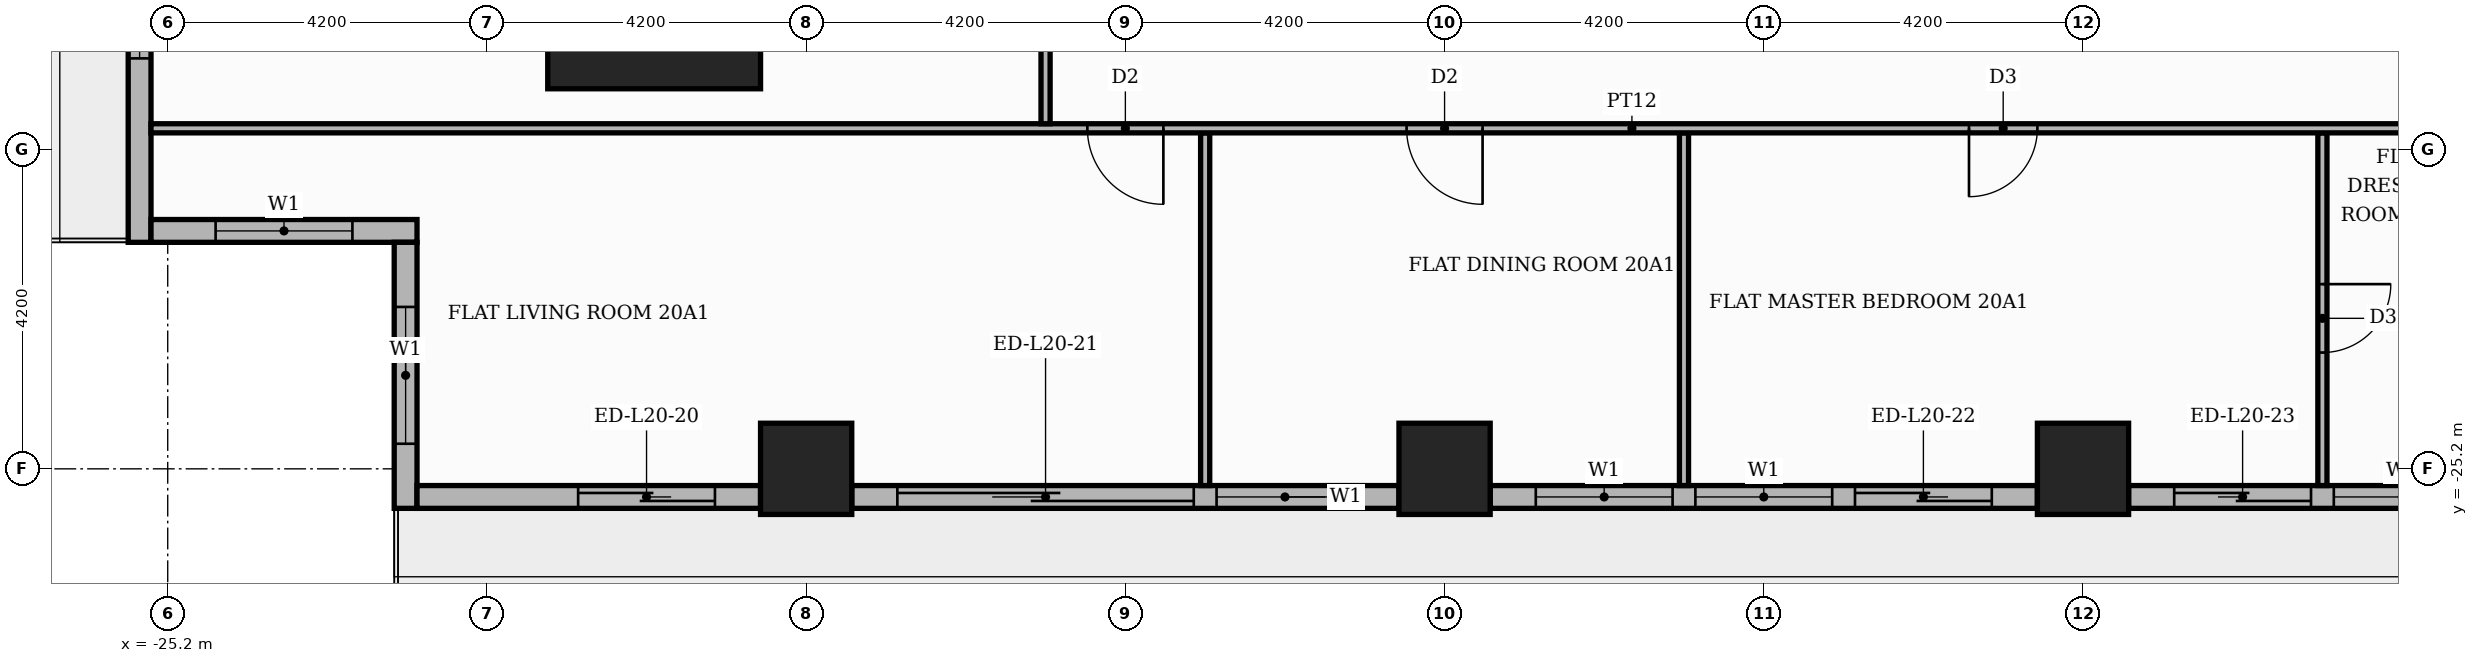
"""IFC4 building model, lengths in metres.
Left out: names, types, materials, properties, quantities, classifications, styles, units other than length and angle.
Written with IfcOpenShell. Run it as: python <this file> out.ifc"""

import sys

from ifc_helpers import new_model, si_unit, direction, frame, frame_2d, origin, origin_2d, place, context, subcontext, project, spatial, rectangle, extrude, element, fill, save


model = new_model("IFC4")
c1 = context("Model", 3, precision=1e-05, world=origin(), true_north=direction((0.0, 1.0)))
c2 = subcontext(c1, "Body", "Model", "MODEL_VIEW")
j1 = project(units=[si_unit("LENGTHUNIT", "METRE"), si_unit("PLANEANGLEUNIT", "RADIAN")], contexts=[c1])
p1 = place(None, origin())
s1 = spatial("IfcSite", under=j1, at=p1, CompositionType="ELEMENT")
p2 = place(p1, origin())
s2 = spatial("IfcBuilding", under=s1, at=p2, CompositionType="ELEMENT")
p3 = place(p2, frame((0.0, 0.0, 87.0)))
s3 = spatial("IfcBuildingStorey", under=s2, at=p3, CompositionType="ELEMENT", Elevation=87.0)
p4 = place(p3, frame((-18.8, -18.8, 0.0), z_axis=(0.0, 0.0, 1.0), x_axis=(1.0, 0.0, 0.0)))
e1 = element("IfcColumn", 1, at=p4, inside=s3, PredefinedType="COLUMN", context=c2, shape_type="SweptSolid", body=[
    extrude(rectangle(XDim=2.8, YDim=2.8, at=origin_2d()), origin(), (0.0, 0.0, 1.0), 3.9),
])
for number, where, z_axis, x_axis in (
    (2, (0.0, -25.2, 0.0), (0.0, 0.0, 1.0), (1.0, 0.0, 0.0)),
    (3, (-8.4, -25.2, 0.0), (0.0, 0.0, 1.0), (1.0, 0.0, 0.0)),
    (4, (-16.8, -25.2, 0.0), (0.0, 0.0, 1.0), (1.0, 0.0, 0.0)),
):
    element("IfcColumn", number, at=place(p3, frame(where, z_axis=z_axis, x_axis=x_axis)), inside=s3, PredefinedType="COLUMN", context=c2, shape_type="SweptSolid", body=[
        extrude(rectangle(XDim=1.2, YDim=1.2, at=origin_2d()), origin(), (0.0, 0.0, 1.0), 3.9),
    ])
p5 = place(p3, frame((-25.57, -17.4, 0.0), z_axis=(0.0, 0.0, 1.0), x_axis=(0.0, -1.0, 0.0)))
e5 = element("IfcWall", 5, at=p5, inside=s3, PredefinedType="STANDARD", context=c2, shape_type="SweptSolid", body=[
    extrude(rectangle(XDim=4.82, YDim=0.3, at=frame_2d((2.41, 0.0))), origin(), (0.0, 0.0, 1.0), 3.48),
])
p6 = place(p5, frame((0.6, 0.0, 0.9)))
e6 = element("IfcOpeningElement", 6, at=p6, cuts=e5, PredefinedType="OPENING", context=c2, shape_type="SweptSolid", body=[
    extrude(rectangle(XDim=1.8, YDim=2.1, at=frame_2d((0.9, 1.05))), frame((0.0, 0.16, 0.0), z_axis=(0.0, -1.0, 0.0), x_axis=(1.0, 0.0, 0.0)), (0.0, 0.0, 1.0), 0.32),
])
p7 = place(p3, frame((-25.42, -22.07, 0.0), z_axis=(0.0, 0.0, 1.0), x_axis=(1.0, 0.0, 0.0)))
e7 = element("IfcWall", 7, at=p7, inside=s3, PredefinedType="STANDARD", context=c2, shape_type="SweptSolid", body=[
    extrude(rectangle(XDim=3.5, YDim=0.3, at=frame_2d((1.75, 0.0))), origin(), (0.0, 0.0, 1.0), 3.48),
])
p8 = place(p7, frame((0.85, 0.0, 0.9)))
e8 = element("IfcOpeningElement", 8, at=p8, cuts=e7, PredefinedType="OPENING", context=c2, shape_type="SweptSolid", body=[
    extrude(rectangle(XDim=1.8, YDim=2.1, at=frame_2d((0.9, 1.05))), frame((0.0, 0.16, 0.0), z_axis=(0.0, -1.0, 0.0), x_axis=(1.0, 0.0, 0.0)), (0.0, 0.0, 1.0), 0.32),
])
p9 = place(p3, frame((-22.07, -22.22, 0.0), z_axis=(0.0, 0.0, 1.0), x_axis=(0.0, -1.0, 0.0)))
e9 = element("IfcWall", 9, at=p9, inside=s3, PredefinedType="STANDARD", context=c2, shape_type="SweptSolid", body=[
    extrude(rectangle(XDim=3.5, YDim=0.3, at=frame_2d((1.75, 0.0))), origin(), (0.0, 0.0, 1.0), 3.48),
])
p10 = place(p9, frame((0.85, 0.0, 0.9)))
e10 = element("IfcOpeningElement", 10, at=p10, cuts=e9, PredefinedType="OPENING", context=c2, shape_type="SweptSolid", body=[
    extrude(rectangle(XDim=1.8, YDim=2.1, at=frame_2d((0.9, 1.05))), frame((0.0, 0.16, 0.0), z_axis=(0.0, -1.0, 0.0), x_axis=(1.0, 0.0, 0.0)), (0.0, 0.0, 1.0), 0.32),
])
p11 = place(p3, frame((-21.92, -25.57, 0.0), z_axis=(0.0, 0.0, 1.0), x_axis=(1.0, 0.0, 0.0)))
e11 = element("IfcWall", 11, at=p11, inside=s3, PredefinedType="STANDARD", context=c2, shape_type="SweptSolid", body=[
    extrude(rectangle(XDim=4.52, YDim=0.3, at=frame_2d((2.26, 0.0))), origin(), (0.0, 0.0, 1.0), 3.48),
])
p12 = place(p11, frame((2.12, 0.0, 0.0)))
e12 = element("IfcOpeningElement", 12, at=p12, cuts=e11, PredefinedType="OPENING", context=c2, shape_type="SweptSolid", body=[
    extrude(rectangle(XDim=1.8, YDim=2.4, at=frame_2d((0.9, 1.2))), frame((0.0, 0.16, 0.0), z_axis=(0.0, -1.0, 0.0), x_axis=(1.0, 0.0, 0.0)), (0.0, 0.0, 1.0), 0.32),
])
p13 = place(p3, frame((-16.2, -25.57, 0.0), z_axis=(0.0, 0.0, 1.0), x_axis=(1.0, 0.0, 0.0)))
e13 = element("IfcWall", 13, at=p13, inside=s3, PredefinedType="STANDARD", context=c2, shape_type="SweptSolid", body=[
    extrude(rectangle(XDim=7.2, YDim=0.3, at=frame_2d((3.6, 0.0))), origin(), (0.0, 0.0, 1.0), 3.48),
])
p14 = place(p13, frame((0.6, 0.0, 0.0)))
e14 = element("IfcOpeningElement", 14, at=p14, cuts=e13, PredefinedType="OPENING", context=c2, shape_type="SweptSolid", body=[
    extrude(rectangle(XDim=3.9, YDim=2.4, at=frame_2d((1.95, 1.2))), frame((0.0, 0.16, 0.0), z_axis=(0.0, -1.0, 0.0), x_axis=(1.0, 0.0, 0.0)), (0.0, 0.0, 1.0), 0.32),
])
p15 = place(p13, frame((4.8, 0.0, 0.9)))
e15 = element("IfcOpeningElement", 15, at=p15, cuts=e13, PredefinedType="OPENING", context=c2, shape_type="SweptSolid", body=[
    extrude(rectangle(XDim=1.8, YDim=2.1, at=frame_2d((0.9, 1.05))), frame((0.0, 0.16, 0.0), z_axis=(0.0, -1.0, 0.0), x_axis=(1.0, 0.0, 0.0)), (0.0, 0.0, 1.0), 0.32),
])
p16 = place(p3, frame((-7.8, -25.57, 0.0), z_axis=(0.0, 0.0, 1.0), x_axis=(1.0, 0.0, 0.0)))
e16 = element("IfcWall", 16, at=p16, inside=s3, PredefinedType="STANDARD", context=c2, shape_type="SweptSolid", body=[
    extrude(rectangle(XDim=7.2, YDim=0.3, at=frame_2d((3.6, 0.0))), origin(), (0.0, 0.0, 1.0), 3.48),
])
p17 = place(p16, frame((0.6, 0.0, 0.9)))
e17 = element("IfcOpeningElement", 17, at=p17, cuts=e16, PredefinedType="OPENING", context=c2, shape_type="SweptSolid", body=[
    extrude(rectangle(XDim=1.8, YDim=2.1, at=frame_2d((0.9, 1.05))), frame((0.0, 0.16, 0.0), z_axis=(0.0, -1.0, 0.0), x_axis=(1.0, 0.0, 0.0)), (0.0, 0.0, 1.0), 0.32),
])
p18 = place(p16, frame((2.7, 0.0, 0.9)))
e18 = element("IfcOpeningElement", 18, at=p18, cuts=e16, PredefinedType="OPENING", context=c2, shape_type="SweptSolid", body=[
    extrude(rectangle(XDim=1.8, YDim=2.1, at=frame_2d((0.9, 1.05))), frame((0.0, 0.16, 0.0), z_axis=(0.0, -1.0, 0.0), x_axis=(1.0, 0.0, 0.0)), (0.0, 0.0, 1.0), 0.32),
])
p19 = place(p16, frame((4.8, 0.0, 0.0)))
e19 = element("IfcOpeningElement", 19, at=p19, cuts=e16, PredefinedType="OPENING", context=c2, shape_type="SweptSolid", body=[
    extrude(rectangle(XDim=1.8, YDim=2.4, at=frame_2d((0.9, 1.2))), frame((0.0, 0.16, 0.0), z_axis=(0.0, -1.0, 0.0), x_axis=(1.0, 0.0, 0.0)), (0.0, 0.0, 1.0), 0.32),
])
p20 = place(p3, frame((0.6, -25.57, 0.0), z_axis=(0.0, 0.0, 1.0), x_axis=(1.0, 0.0, 0.0)))
e20 = element("IfcWall", 20, at=p20, inside=s3, PredefinedType="STANDARD", context=c2, shape_type="SweptSolid", body=[
    extrude(rectangle(XDim=7.2, YDim=0.3, at=frame_2d((3.6, 0.0))), origin(), (0.0, 0.0, 1.0), 3.48),
])
p21 = place(p20, frame((0.6, 0.0, 0.0)))
e21 = element("IfcOpeningElement", 21, at=p21, cuts=e20, PredefinedType="OPENING", context=c2, shape_type="SweptSolid", body=[
    extrude(rectangle(XDim=1.8, YDim=2.4, at=frame_2d((0.9, 1.2))), frame((0.0, 0.16, 0.0), z_axis=(0.0, -1.0, 0.0), x_axis=(1.0, 0.0, 0.0)), (0.0, 0.0, 1.0), 0.32),
])
p22 = place(p20, frame((2.7, 0.0, 0.9)))
e22 = element("IfcOpeningElement", 22, at=p22, cuts=e20, PredefinedType="OPENING", context=c2, shape_type="SweptSolid", body=[
    extrude(rectangle(XDim=1.8, YDim=2.1, at=frame_2d((0.9, 1.05))), frame((0.0, 0.16, 0.0), z_axis=(0.0, -1.0, 0.0), x_axis=(1.0, 0.0, 0.0)), (0.0, 0.0, 1.0), 0.32),
])
p23 = place(p20, frame((4.8, 0.0, 0.9)))
e23 = element("IfcOpeningElement", 23, at=p23, cuts=e20, PredefinedType="OPENING", context=c2, shape_type="SweptSolid", body=[
    extrude(rectangle(XDim=1.8, YDim=2.1, at=frame_2d((0.9, 1.05))), frame((0.0, 0.16, 0.0), z_axis=(0.0, -1.0, 0.0), x_axis=(1.0, 0.0, 0.0)), (0.0, 0.0, 1.0), 0.32),
])
for number, where, z_axis, x_axis in (
    (24, (-11.55, -25.42, 0.0), (0.0, 0.0, 1.0), (0.0, 1.0, 0.0)),
    (25, (-5.25, -25.42, 0.0), (0.0, 0.0, 1.0), (0.0, 1.0, 0.0)),
):
    element("IfcWall", number, at=place(p3, frame(where, z_axis=z_axis, x_axis=x_axis)), inside=s3, PredefinedType="PARTITIONING", context=c2, shape_type="SweptSolid", body=[
        extrude(rectangle(XDim=4.64, YDim=0.12, at=frame_2d((2.32, 0.0))), origin(), (0.0, 0.0, 1.0), 3.48),
    ])
p24 = place(p3, frame((3.15, -25.42, 0.0), z_axis=(0.0, 0.0, 1.0), x_axis=(0.0, 1.0, 0.0)))
e26 = element("IfcWall", 26, at=p24, inside=s3, PredefinedType="PARTITIONING", context=c2, shape_type="SweptSolid", body=[
    extrude(rectangle(XDim=4.64, YDim=0.12, at=frame_2d((2.32, 0.0))), origin(), (0.0, 0.0, 1.0), 3.48),
])
p25 = place(p24, frame((1.75, 0.0, 0.0)))
e27 = element("IfcOpeningElement", 27, at=p25, cuts=e26, PredefinedType="OPENING", context=c2, shape_type="SweptSolid", body=[
    extrude(rectangle(XDim=0.9, YDim=2.1, at=frame_2d((0.45, 1.05))), frame((0.0, 0.07, 0.0), z_axis=(0.0, -1.0, 0.0), x_axis=(1.0, 0.0, 0.0)), (0.0, 0.0, 1.0), 0.14),
])
p26 = place(p3, frame((-25.42, -20.72, 0.0), z_axis=(0.0, 0.0, 1.0), x_axis=(1.0, 0.0, 0.0)))
e28 = element("IfcWall", 28, at=p26, inside=s3, PredefinedType="PARTITIONING", context=c2, shape_type="SweptSolid", body=[
    extrude(rectangle(XDim=38.97, YDim=0.12, at=frame_2d((19.485, 0.0))), origin(), (0.0, 0.0, 1.0), 3.48),
])
p27 = place(p26, frame((12.32, 0.0, 0.0)))
e29 = element("IfcOpeningElement", 29, at=p27, cuts=e28, PredefinedType="OPENING", context=c2, shape_type="SweptSolid", body=[
    extrude(rectangle(XDim=1.0, YDim=2.1, at=frame_2d((0.5, 1.05))), frame((0.0, 0.07, 0.0), z_axis=(0.0, -1.0, 0.0), x_axis=(1.0, 0.0, 0.0)), (0.0, 0.0, 1.0), 0.14),
])
p28 = place(p26, frame((16.52, 0.0, 0.0)))
e30 = element("IfcOpeningElement", 30, at=p28, cuts=e28, PredefinedType="OPENING", context=c2, shape_type="SweptSolid", body=[
    extrude(rectangle(XDim=1.0, YDim=2.1, at=frame_2d((0.5, 1.05))), frame((0.0, 0.07, 0.0), z_axis=(0.0, -1.0, 0.0), x_axis=(1.0, 0.0, 0.0)), (0.0, 0.0, 1.0), 0.14),
])
p29 = place(p26, frame((23.92, 0.0, 0.0)))
e31 = element("IfcOpeningElement", 31, at=p29, cuts=e28, PredefinedType="OPENING", context=c2, shape_type="SweptSolid", body=[
    extrude(rectangle(XDim=0.9, YDim=2.1, at=frame_2d((0.45, 1.05))), frame((0.0, 0.07, 0.0), z_axis=(0.0, -1.0, 0.0), x_axis=(1.0, 0.0, 0.0)), (0.0, 0.0, 1.0), 0.14),
])
p30 = place(p26, frame((34.42, 0.0, 0.0)))
e32 = element("IfcOpeningElement", 32, at=p30, cuts=e28, PredefinedType="OPENING", context=c2, shape_type="SweptSolid", body=[
    extrude(rectangle(XDim=0.9, YDim=2.1, at=frame_2d((0.45, 1.05))), frame((0.0, 0.07, 0.0), z_axis=(0.0, -1.0, 0.0), x_axis=(1.0, 0.0, 0.0)), (0.0, 0.0, 1.0), 0.14),
])
p31 = place(p3, frame((-13.65, -20.66, 0.0), z_axis=(0.0, 0.0, 1.0), x_axis=(0.0, 1.0, 0.0)))
e33 = element("IfcWall", 33, at=p31, inside=s3, PredefinedType="PARTITIONING", context=c2, shape_type="SweptSolid", body=[
    extrude(rectangle(XDim=6.91, YDim=0.12, at=frame_2d((3.455, 0.0))), origin(), (0.0, 0.0, 1.0), 3.48),
])
p32 = place(p31, frame((3.025, 0.0, 0.0)))
e34 = element("IfcOpeningElement", 34, at=p32, cuts=e33, PredefinedType="OPENING", context=c2, shape_type="SweptSolid", body=[
    extrude(rectangle(XDim=0.9, YDim=2.1, at=frame_2d((0.45, 1.05))), frame((0.0, 0.07, 0.0), z_axis=(0.0, -1.0, 0.0), x_axis=(1.0, 0.0, 0.0)), (0.0, 0.0, 1.0), 0.14),
])
p33 = place(p6, origin())
e35 = element("IfcWindow", 35, at=p33, inside=s3, PartitioningType="SINGLE_PANEL", PredefinedType="WINDOW", context=c2, shape_type="SweptSolid", body=[
    extrude(rectangle(XDim=1.8, YDim=2.1, at=frame_2d((0.9, 1.05))), frame((0.0, 0.03, 0.0), z_axis=(0.0, -1.0, 0.0), x_axis=(1.0, 0.0, 0.0)), (0.0, 0.0, 1.0), 0.06),
])
fill(e6, e35)
p34 = place(p8, origin())
e36 = element("IfcWindow", 36, at=p34, inside=s3, PartitioningType="SINGLE_PANEL", PredefinedType="WINDOW", context=c2, shape_type="SweptSolid", body=[
    extrude(rectangle(XDim=1.8, YDim=2.1, at=frame_2d((0.9, 1.05))), frame((0.0, 0.03, 0.0), z_axis=(0.0, -1.0, 0.0), x_axis=(1.0, 0.0, 0.0)), (0.0, 0.0, 1.0), 0.06),
])
fill(e8, e36)
p35 = place(p10, origin())
e37 = element("IfcWindow", 37, at=p35, inside=s3, PartitioningType="SINGLE_PANEL", PredefinedType="WINDOW", context=c2, shape_type="SweptSolid", body=[
    extrude(rectangle(XDim=1.8, YDim=2.1, at=frame_2d((0.9, 1.05))), frame((0.0, 0.03, 0.0), z_axis=(0.0, -1.0, 0.0), x_axis=(1.0, 0.0, 0.0)), (0.0, 0.0, 1.0), 0.06),
])
fill(e10, e37)
p36 = place(p12, origin())
e38 = element("IfcDoor", 38, at=p36, inside=s3, OperationType="SLIDING_TO_RIGHT", PredefinedType="DOOR", context=c2, shape_type="SweptSolid", body=[
    extrude(rectangle(XDim=1.8, YDim=2.4, at=frame_2d((0.9, 1.2))), frame((0.0, 0.025, 0.0), z_axis=(0.0, -1.0, 0.0), x_axis=(1.0, 0.0, 0.0)), (0.0, 0.0, 1.0), 0.05),
])
fill(e12, e38)
p37 = place(p14, origin())
e39 = element("IfcDoor", 39, at=p37, inside=s3, OperationType="SLIDING_TO_LEFT", PredefinedType="DOOR", context=c2, shape_type="SweptSolid", body=[
    extrude(rectangle(XDim=3.9, YDim=2.4, at=frame_2d((1.95, 1.2))), frame((0.0, 0.025, 0.0), z_axis=(0.0, -1.0, 0.0), x_axis=(1.0, 0.0, 0.0)), (0.0, 0.0, 1.0), 0.05),
])
fill(e14, e39)
p38 = place(p15, origin())
e40 = element("IfcWindow", 40, at=p38, inside=s3, PartitioningType="SINGLE_PANEL", PredefinedType="WINDOW", context=c2, shape_type="SweptSolid", body=[
    extrude(rectangle(XDim=1.8, YDim=2.1, at=frame_2d((0.9, 1.05))), frame((0.0, 0.03, 0.0), z_axis=(0.0, -1.0, 0.0), x_axis=(1.0, 0.0, 0.0)), (0.0, 0.0, 1.0), 0.06),
])
fill(e15, e40)
p39 = place(p17, origin())
e41 = element("IfcWindow", 41, at=p39, inside=s3, PartitioningType="SINGLE_PANEL", PredefinedType="WINDOW", context=c2, shape_type="SweptSolid", body=[
    extrude(rectangle(XDim=1.8, YDim=2.1, at=frame_2d((0.9, 1.05))), frame((0.0, 0.03, 0.0), z_axis=(0.0, -1.0, 0.0), x_axis=(1.0, 0.0, 0.0)), (0.0, 0.0, 1.0), 0.06),
])
fill(e17, e41)
p40 = place(p18, origin())
e42 = element("IfcWindow", 42, at=p40, inside=s3, PartitioningType="SINGLE_PANEL", PredefinedType="WINDOW", context=c2, shape_type="SweptSolid", body=[
    extrude(rectangle(XDim=1.8, YDim=2.1, at=frame_2d((0.9, 1.05))), frame((0.0, 0.03, 0.0), z_axis=(0.0, -1.0, 0.0), x_axis=(1.0, 0.0, 0.0)), (0.0, 0.0, 1.0), 0.06),
])
fill(e18, e42)
p41 = place(p19, origin())
e43 = element("IfcDoor", 43, at=p41, inside=s3, OperationType="SLIDING_TO_RIGHT", PredefinedType="DOOR", context=c2, shape_type="SweptSolid", body=[
    extrude(rectangle(XDim=1.8, YDim=2.4, at=frame_2d((0.9, 1.2))), frame((0.0, 0.025, 0.0), z_axis=(0.0, -1.0, 0.0), x_axis=(1.0, 0.0, 0.0)), (0.0, 0.0, 1.0), 0.05),
])
fill(e19, e43)
p42 = place(p21, origin())
e44 = element("IfcDoor", 44, at=p42, inside=s3, OperationType="SLIDING_TO_LEFT", PredefinedType="DOOR", context=c2, shape_type="SweptSolid", body=[
    extrude(rectangle(XDim=1.8, YDim=2.4, at=frame_2d((0.9, 1.2))), frame((0.0, 0.025, 0.0), z_axis=(0.0, -1.0, 0.0), x_axis=(1.0, 0.0, 0.0)), (0.0, 0.0, 1.0), 0.05),
])
fill(e21, e44)
p43 = place(p22, origin())
e45 = element("IfcWindow", 45, at=p43, inside=s3, PartitioningType="SINGLE_PANEL", PredefinedType="WINDOW", context=c2, shape_type="SweptSolid", body=[
    extrude(rectangle(XDim=1.8, YDim=2.1, at=frame_2d((0.9, 1.05))), frame((0.0, 0.03, 0.0), z_axis=(0.0, -1.0, 0.0), x_axis=(1.0, 0.0, 0.0)), (0.0, 0.0, 1.0), 0.06),
])
fill(e22, e45)
p44 = place(p27, frame((1.0, 0.0, 0.0), z_axis=(0.0, 0.0, 1.0), x_axis=(-1.0, 0.0, 0.0)))
e46 = element("IfcDoor", 46, at=p44, inside=s3, OperationType="SINGLE_SWING_RIGHT", PredefinedType="DOOR", context=c2, shape_type="SweptSolid", body=[
    extrude(rectangle(XDim=1.0, YDim=2.1, at=frame_2d((0.5, 1.05))), frame((0.0, 0.025, 0.0), z_axis=(0.0, -1.0, 0.0), x_axis=(1.0, 0.0, 0.0)), (0.0, 0.0, 1.0), 0.05),
])
fill(e29, e46)
p45 = place(p28, frame((1.0, 0.0, 0.0), z_axis=(0.0, 0.0, 1.0), x_axis=(-1.0, 0.0, 0.0)))
e47 = element("IfcDoor", 47, at=p45, inside=s3, OperationType="SINGLE_SWING_RIGHT", PredefinedType="DOOR", context=c2, shape_type="SweptSolid", body=[
    extrude(rectangle(XDim=1.0, YDim=2.1, at=frame_2d((0.5, 1.05))), frame((0.0, 0.025, 0.0), z_axis=(0.0, -1.0, 0.0), x_axis=(1.0, 0.0, 0.0)), (0.0, 0.0, 1.0), 0.05),
])
fill(e30, e47)
p46 = place(p29, frame((0.9, 0.0, 0.0), z_axis=(0.0, 0.0, 1.0), x_axis=(-1.0, 0.0, 0.0)))
e48 = element("IfcDoor", 48, at=p46, inside=s3, OperationType="SINGLE_SWING_LEFT", PredefinedType="DOOR", context=c2, shape_type="SweptSolid", body=[
    extrude(rectangle(XDim=0.9, YDim=2.1, at=frame_2d((0.45, 1.05))), frame((0.0, 0.025, 0.0), z_axis=(0.0, -1.0, 0.0), x_axis=(1.0, 0.0, 0.0)), (0.0, 0.0, 1.0), 0.05),
])
fill(e31, e48)
p47 = place(p25, frame((0.9, 0.0, 0.0), z_axis=(0.0, 0.0, 1.0), x_axis=(-1.0, 0.0, 0.0)))
e49 = element("IfcDoor", 49, at=p47, inside=s3, OperationType="SINGLE_SWING_RIGHT", PredefinedType="DOOR", context=c2, shape_type="SweptSolid", body=[
    extrude(rectangle(XDim=0.9, YDim=2.1, at=frame_2d((0.45, 1.05))), frame((0.0, 0.025, 0.0), z_axis=(0.0, -1.0, 0.0), x_axis=(1.0, 0.0, 0.0)), (0.0, 0.0, 1.0), 0.05),
])
fill(e27, e49)
save(model, sys.argv[1])
